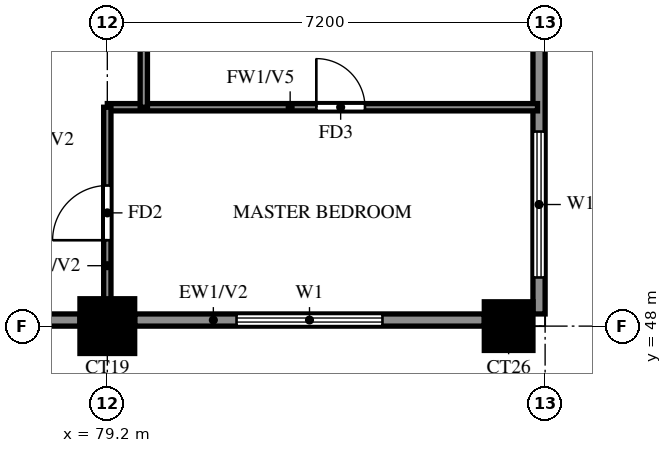
"""IFC4 building model, lengths in metres.
Left out: names, types, materials, properties, quantities, classifications, styles, units other than length and angle.
Written with IfcOpenShell. Run it as: python <this file> out.ifc"""

import sys

from ifc_helpers import new_model, si_unit, direction, frame, frame_2d, origin, origin_2d, place, context, subcontext, project, spatial, rectangle, extrude, source, transform, mapped, element, fill, save


model = new_model("IFC4")
c1 = context("Model", 3, precision=1e-05, world=origin(), true_north=direction((0.0, 1.0)))
c2 = subcontext(c1, "Body", "Model", "MODEL_VIEW")
j1 = project(units=[si_unit("LENGTHUNIT", "METRE"), si_unit("PLANEANGLEUNIT", "RADIAN")], contexts=[c1])
p1 = place(None, origin())
s1 = spatial("IfcSite", under=j1, at=p1, CompositionType="ELEMENT")
p2 = place(p1, origin())
s2 = spatial("IfcBuilding", under=s1, at=p2, CompositionType="ELEMENT")
p3 = place(p2, frame((0.0, 0.0, 195.5)))
s3 = spatial("IfcBuildingStorey", under=s2, at=p3, CompositionType="ELEMENT", Elevation=195.5)
m1 = source(origin(), c2, "Body", "SweptSolid", [
    extrude(rectangle(XDim=0.9, YDim=0.9, at=origin_2d()), origin(), (0.0, 0.0, 1.0), 3.2),
])
p4 = place(p3, frame((79.2, 48.0, 0.0), z_axis=(0.0, 0.0, 1.0), x_axis=(1.0, 0.0, 0.0)))
e1 = element("IfcColumn", 1, at=p4, inside=s3, PredefinedType="COLUMN", context=c2, shape_type="MappedRepresentation", body=[
    mapped(m1, transform((0.0, 0.0, 0.0))),
])
m2 = source(origin(), c2, "Body", "SweptSolid", [
    extrude(rectangle(XDim=0.8, YDim=0.8, at=origin_2d()), origin(), (0.0, 0.0, 1.0), 3.2),
])
p5 = place(p3, frame((85.8, 48.0, 0.0), z_axis=(0.0, 0.0, 1.0), x_axis=(1.0, 0.0, 0.0)))
e2 = element("IfcColumn", 2, at=p5, inside=s3, PredefinedType="COLUMN", context=c2, shape_type="MappedRepresentation", body=[
    mapped(m2, transform((0.0, 0.0, 0.0))),
])
p6 = place(p3, frame((85.719, 39.881, 0.0), z_axis=(0.0, 0.0, 1.0), x_axis=(-0.86377618652, 0.503875678716, 0.0)))
e3 = element("IfcWall", 3, at=p6, inside=s3, PredefinedType="SOLIDWALL", context=c2, shape_type="SweptSolid", body=[
    extrude(rectangle(XDim=16.311, YDim=0.2, at=frame_2d((8.156, 0.0))), origin(), (0.0, 0.0, 1.0), 3.2),
])
p7 = place(p6, frame((13.326, 0.0, 1.5)))
e4 = element("IfcOpeningElement", 4, at=p7, cuts=e3, PredefinedType="OPENING", context=c2, shape_type="SweptSolid", body=[
    extrude(rectangle(XDim=0.9, YDim=0.9, at=frame_2d((0.45, 0.45))), frame((0.0, 0.11, 0.0), z_axis=(0.0, -1.0, 0.0), x_axis=(1.0, 0.0, 0.0)), (0.0, 0.0, 1.0), 0.22),
])
p8 = place(p3, frame((71.99, 48.1, 0.0), z_axis=(0.0, 0.0, 1.0), x_axis=(1.0, 0.0, 0.0)))
e5 = element("IfcWall", 5, at=p8, inside=s3, PredefinedType="SOLIDWALL", context=c2, shape_type="SweptSolid", body=[
    extrude(rectangle(XDim=6.76, YDim=0.2, at=frame_2d((3.38, 0.0))), origin(), (0.0, 0.0, 1.0), 3.2),
])
p9 = place(p8, frame((2.205, 0.0, 1.5)))
e6 = element("IfcOpeningElement", 6, at=p9, cuts=e5, PredefinedType="OPENING", context=c2, shape_type="SweptSolid", body=[
    extrude(rectangle(XDim=0.9, YDim=0.9, at=frame_2d((0.45, 0.45))), frame((0.0, 0.11, 0.0), z_axis=(0.0, -1.0, 0.0), x_axis=(1.0, 0.0, 0.0)), (0.0, 0.0, 1.0), 0.22),
])
p10 = place(p3, frame((79.65, 48.1, 0.0), z_axis=(0.0, 0.0, 1.0), x_axis=(1.0, 0.0, 0.0)))
e7 = element("IfcWall", 7, at=p10, inside=s3, PredefinedType="SOLIDWALL", context=c2, shape_type="SweptSolid", body=[
    extrude(rectangle(XDim=5.75, YDim=0.2, at=frame_2d((2.875, 0.0))), origin(), (0.0, 0.0, 1.0), 3.2),
])
p11 = place(p10, frame((1.675, 0.0, 0.6)))
e8 = element("IfcOpeningElement", 8, at=p11, cuts=e7, PredefinedType="OPENING", context=c2, shape_type="SweptSolid", body=[
    extrude(rectangle(XDim=2.4, YDim=2.4, at=frame_2d((1.2, 1.2))), frame((0.0, 0.11, 0.0), z_axis=(0.0, -1.0, 0.0), x_axis=(1.0, 0.0, 0.0)), (0.0, 0.0, 1.0), 0.22),
])
p12 = place(p3, frame((86.3, 48.2, 0.0), z_axis=(0.0, 0.0, 1.0), x_axis=(0.0, 1.0, 0.0)))
e9 = element("IfcWall", 9, at=p12, inside=s3, PredefinedType="SOLIDWALL", context=c2, shape_type="SweptSolid", body=[
    extrude(rectangle(XDim=28.6, YDim=0.2, at=frame_2d((14.3, 0.0))), origin(), (0.0, 0.0, 1.0), 3.2),
])
p13 = place(p12, frame((15.1, 0.0, 0.0)))
e10 = element("IfcOpeningElement", 10, at=p13, cuts=e9, PredefinedType="OPENING", context=c2, shape_type="SweptSolid", body=[
    extrude(rectangle(XDim=1.8, YDim=2.4, at=frame_2d((0.9, 1.2))), frame((0.0, 0.11, 0.0), z_axis=(0.0, -1.0, 0.0), x_axis=(1.0, 0.0, 0.0)), (0.0, 0.0, 1.0), 0.22),
])
p14 = place(p12, frame((0.6, 0.0, 0.6)))
e11 = element("IfcOpeningElement", 11, at=p14, cuts=e9, PredefinedType="OPENING", context=c2, shape_type="SweptSolid", body=[
    extrude(rectangle(XDim=2.4, YDim=2.4, at=frame_2d((1.2, 1.2))), frame((0.0, 0.11, 0.0), z_axis=(0.0, -1.0, 0.0), x_axis=(1.0, 0.0, 0.0)), (0.0, 0.0, 1.0), 0.22),
])
p15 = place(p12, frame((4.575, 0.0, 1.5)))
e12 = element("IfcOpeningElement", 12, at=p15, cuts=e9, PredefinedType="OPENING", context=c2, shape_type="SweptSolid", body=[
    extrude(rectangle(XDim=0.9, YDim=0.9, at=frame_2d((0.45, 0.45))), frame((0.0, 0.11, 0.0), z_axis=(0.0, -1.0, 0.0), x_axis=(1.0, 0.0, 0.0)), (0.0, 0.0, 1.0), 0.22),
])
p16 = place(p12, frame((8.375, 0.0, 0.6)))
e13 = element("IfcOpeningElement", 13, at=p16, cuts=e9, PredefinedType="OPENING", context=c2, shape_type="SweptSolid", body=[
    extrude(rectangle(XDim=2.4, YDim=2.4, at=frame_2d((1.2, 1.2))), frame((0.0, 0.11, 0.0), z_axis=(0.0, -1.0, 0.0), x_axis=(1.0, 0.0, 0.0)), (0.0, 0.0, 1.0), 0.22),
])
p17 = place(p12, frame((12.525, 0.0, 0.6)))
e14 = element("IfcOpeningElement", 14, at=p17, cuts=e9, PredefinedType="OPENING", context=c2, shape_type="SweptSolid", body=[
    extrude(rectangle(XDim=1.2, YDim=2.4, at=frame_2d((0.6, 1.2))), frame((0.0, 0.11, 0.0), z_axis=(0.0, -1.0, 0.0), x_axis=(1.0, 0.0, 0.0)), (0.0, 0.0, 1.0), 0.22),
])
p18 = place(p12, frame((19.575, 0.0, 1.5)))
e15 = element("IfcOpeningElement", 15, at=p18, cuts=e9, PredefinedType="OPENING", context=c2, shape_type="SweptSolid", body=[
    extrude(rectangle(XDim=0.9, YDim=0.9, at=frame_2d((0.45, 0.45))), frame((0.0, 0.11, 0.0), z_axis=(0.0, -1.0, 0.0), x_axis=(1.0, 0.0, 0.0)), (0.0, 0.0, 1.0), 0.22),
])
p19 = place(p12, frame((22.175, 0.0, 0.6)))
e16 = element("IfcOpeningElement", 16, at=p19, cuts=e9, PredefinedType="OPENING", context=c2, shape_type="SweptSolid", body=[
    extrude(rectangle(XDim=2.4, YDim=2.4, at=frame_2d((1.2, 1.2))), frame((0.0, 0.11, 0.0), z_axis=(0.0, -1.0, 0.0), x_axis=(1.0, 0.0, 0.0)), (0.0, 0.0, 1.0), 0.22),
])
p20 = place(p12, frame((25.425, 0.0, 0.6)))
e17 = element("IfcOpeningElement", 17, at=p20, cuts=e9, PredefinedType="OPENING", context=c2, shape_type="SweptSolid", body=[
    extrude(rectangle(XDim=2.4, YDim=2.4, at=frame_2d((1.2, 1.2))), frame((0.0, 0.11, 0.0), z_axis=(0.0, -1.0, 0.0), x_axis=(1.0, 0.0, 0.0)), (0.0, 0.0, 1.0), 0.22),
])
p21 = place(p3, frame((79.2, 51.6, 0.0), z_axis=(0.0, 0.0, 1.0), x_axis=(1.0, 0.0, 0.0)))
e18 = element("IfcWall", 18, at=p21, inside=s3, PredefinedType="PARTITIONING", context=c2, shape_type="SweptSolid", body=[
    extrude(rectangle(XDim=7.075, YDim=0.12, at=frame_2d((3.538, 0.0))), origin(), (0.0, 0.0, 1.0), 2.3),
])
p22 = place(p21, frame((3.438, 0.0, 0.0)))
e19 = element("IfcOpeningElement", 19, at=p22, cuts=e18, PredefinedType="OPENING", context=c2, shape_type="SweptSolid", body=[
    extrude(rectangle(XDim=0.8, YDim=2.1, at=frame_2d((0.4, 1.05))), frame((0.0, 0.07, 0.0), z_axis=(0.0, -1.0, 0.0), x_axis=(1.0, 0.0, 0.0)), (0.0, 0.0, 1.0), 0.14),
])
p23 = place(p3, frame((79.2, 48.125, 0.0), z_axis=(0.0, 0.0, 1.0), x_axis=(0.0, 1.0, 0.0)))
e20 = element("IfcWall", 20, at=p23, inside=s3, PredefinedType="PARTITIONING", context=c2, shape_type="SweptSolid", body=[
    extrude(rectangle(XDim=3.475, YDim=0.12, at=frame_2d((1.738, 0.0))), origin(), (0.0, 0.0, 1.0), 3.2),
])
p24 = place(p23, frame((1.288, 0.0, 0.0)))
e21 = element("IfcOpeningElement", 21, at=p24, cuts=e20, PredefinedType="OPENING", context=c2, shape_type="SweptSolid", body=[
    extrude(rectangle(XDim=0.9, YDim=2.1, at=frame_2d((0.45, 1.05))), frame((0.0, 0.07, 0.0), z_axis=(0.0, -1.0, 0.0), x_axis=(1.0, 0.0, 0.0)), (0.0, 0.0, 1.0), 0.14),
])
p25 = place(p3, frame((79.8, 51.6, 0.0), z_axis=(0.0, 0.0, 1.0), x_axis=(0.0, 1.0, 0.0)))
e22 = element("IfcWall", 22, at=p25, inside=s3, PredefinedType="PARTITIONING", context=c2, shape_type="SweptSolid", body=[
    extrude(rectangle(XDim=3.6, YDim=0.12, at=frame_2d((1.8, 0.0))), origin(), (0.0, 0.0, 1.0), 3.2),
])
p26 = place(p11, origin())
e23 = element("IfcWindow", 23, at=p26, inside=s3, PartitioningType="DOUBLE_PANEL_VERTICAL", PredefinedType="WINDOW", context=c2, shape_type="SweptSolid", body=[
    extrude(rectangle(XDim=2.4, YDim=2.4, at=frame_2d((1.2, 1.2))), frame((0.0, 0.03, 0.0), z_axis=(0.0, -1.0, 0.0), x_axis=(1.0, 0.0, 0.0)), (0.0, 0.0, 1.0), 0.06),
])
fill(e8, e23)
p27 = place(p14, origin())
e24 = element("IfcWindow", 24, at=p27, inside=s3, PartitioningType="DOUBLE_PANEL_VERTICAL", PredefinedType="WINDOW", context=c2, shape_type="SweptSolid", body=[
    extrude(rectangle(XDim=2.4, YDim=2.4, at=frame_2d((1.2, 1.2))), frame((0.0, 0.03, 0.0), z_axis=(0.0, -1.0, 0.0), x_axis=(1.0, 0.0, 0.0)), (0.0, 0.0, 1.0), 0.06),
])
fill(e11, e24)
p28 = place(p24, origin())
e25 = element("IfcDoor", 25, at=p28, inside=s3, OperationType="SINGLE_SWING_LEFT", PredefinedType="DOOR", context=c2, shape_type="SweptSolid", body=[
    extrude(rectangle(XDim=0.9, YDim=2.1, at=frame_2d((0.45, 1.05))), frame((0.0, 0.025, 0.0), z_axis=(0.0, -1.0, 0.0), x_axis=(1.0, 0.0, 0.0)), (0.0, 0.0, 1.0), 0.05),
])
fill(e21, e25)
p29 = place(p22, origin())
e26 = element("IfcDoor", 26, at=p29, inside=s3, OperationType="SINGLE_SWING_RIGHT", PredefinedType="DOOR", context=c2, shape_type="SweptSolid", body=[
    extrude(rectangle(XDim=0.8, YDim=2.1, at=frame_2d((0.4, 1.05))), frame((0.0, 0.025, 0.0), z_axis=(0.0, -1.0, 0.0), x_axis=(1.0, 0.0, 0.0)), (0.0, 0.0, 1.0), 0.05),
])
fill(e19, e26)
save(model, sys.argv[1])
